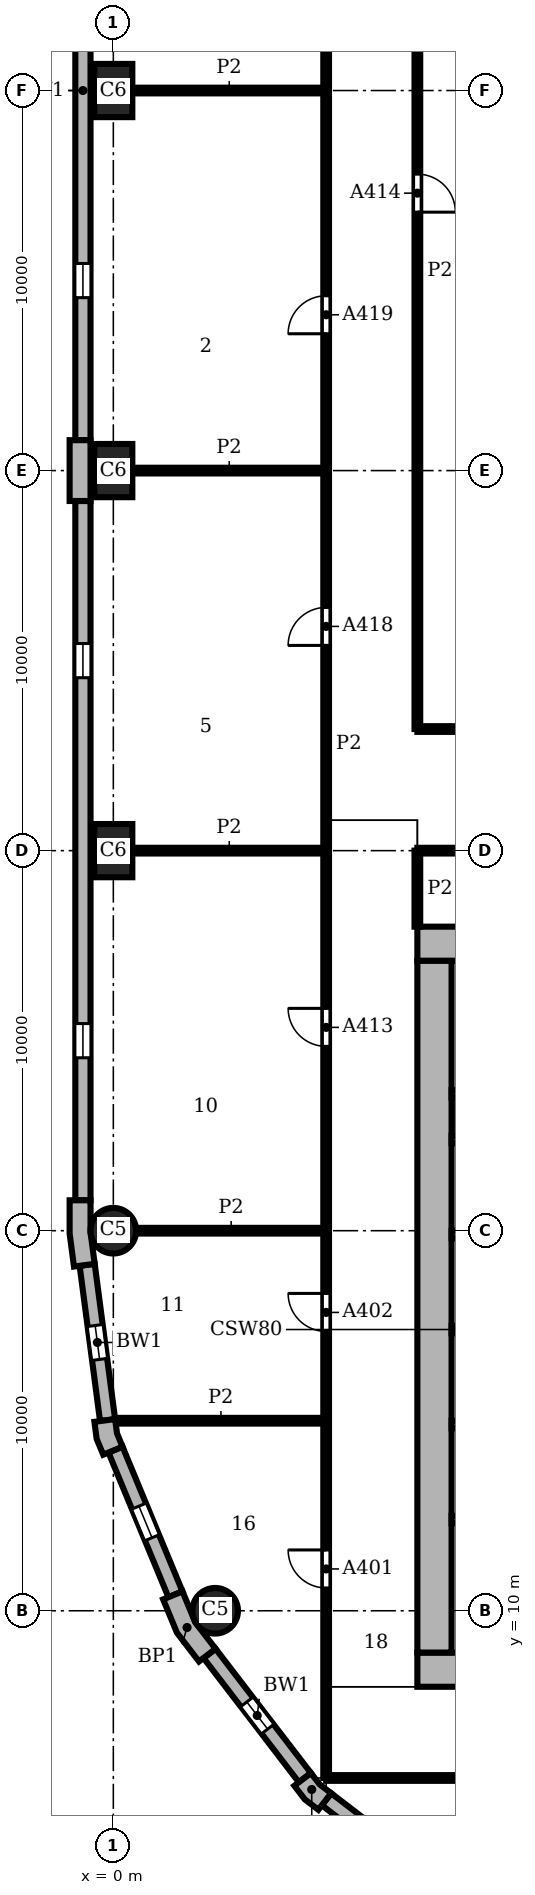
"""IFC4 building model, lengths in metres.
Left out: names, types, materials, properties, quantities, classifications, styles, units other than length and angle.
Written with IfcOpenShell. Run it as: python <this file> out.ifc"""

import sys

from ifc_helpers import new_model, si_unit, direction, frame, frame_2d, origin, origin_2d, place, context, subcontext, project, spatial, polyline, rectangle, circle, outline, extrude, element, fill, save


model = new_model("IFC4")
c1 = context("Model", 3, precision=1e-05, world=origin(), true_north=direction((0.0, 1.0)))
c2 = subcontext(c1, "Body", "Model", "MODEL_VIEW")
j1 = project(units=[si_unit("LENGTHUNIT", "METRE"), si_unit("PLANEANGLEUNIT", "RADIAN")], contexts=[c1])
p1 = place(None, origin())
s1 = spatial("IfcSite", under=j1, at=p1, CompositionType="ELEMENT")
p2 = place(p1, origin())
s2 = spatial("IfcBuilding", under=s1, at=p2, CompositionType="ELEMENT")
p3 = place(p2, frame((0.0, 0.0, 47.1)))
s3 = spatial("IfcBuildingStorey", under=s2, at=p3, CompositionType="ELEMENT", Elevation=47.1)
for number, where, z_axis, x_axis in (
    (1, (0.0, 50.0, 0.0), (0.0, 0.0, 1.0), (0.0, 1.0, 0.0)),
    (2, (0.0, 40.0, 0.0), (0.0, 0.0, 1.0), (0.0, 1.0, 0.0)),
    (3, (0.0, 30.0, 0.0), (0.0, 0.0, 1.0), (0.0, 1.0, 0.0)),
):
    element("IfcColumn", number, at=place(p3, frame(where, z_axis=z_axis, x_axis=x_axis)), inside=s3, PredefinedType="COLUMN", context=c2, shape_type="SweptSolid", body=[
        extrude(rectangle(XDim=1.4, YDim=1.0, at=origin_2d()), origin(), (0.0, 0.0, 1.0), 3.9),
    ])
for number, where, z_axis, x_axis in (
    (4, (0.0, 20.0, 0.0), (0.0, 0.0, 1.0), (1.0, 0.0, 0.0)),
    (5, (2.679, 10.0, 0.0), (0.0, 0.0, 1.0), (1.0, 0.0, 0.0)),
):
    element("IfcColumn", number, at=place(p3, frame(where, z_axis=z_axis, x_axis=x_axis)), inside=s3, PredefinedType="COLUMN", context=c2, shape_type="SweptSolid", body=[
        extrude(circle(Radius=0.6, at=origin_2d()), origin(), (0.0, 0.0, 1.0), 3.9),
    ])
for number, where, z_axis, x_axis in (
    (6, (8.0, 8.45, 0.0), (0.0, 0.0, 1.0), (1.0, 0.0, 0.0)),
    (7, (28.0, 27.55, 0.0), (0.0, 0.0, 1.0), (-1.0, 0.0, 0.0)),
):
    element("IfcWall", number, at=place(p3, frame(where, z_axis=z_axis, x_axis=x_axis)), inside=s3, PredefinedType="SHEAR", context=c2, shape_type="SweptSolid", body=[
        extrude(rectangle(XDim=20.0, YDim=0.9, at=frame_2d((10.0, 0.0))), origin(), (0.0, 0.0, 1.0), 3.9),
    ])
p4 = place(p3, frame((8.45, 27.1, 0.0), z_axis=(0.0, 0.0, 1.0), x_axis=(0.0, -1.0, 0.0)))
e8 = element("IfcWall", 8, at=p4, inside=s3, PredefinedType="SHEAR", context=c2, shape_type="SweptSolid", body=[
    extrude(rectangle(XDim=18.2, YDim=0.9, at=frame_2d((9.1, 0.0))), origin(), (0.0, 0.0, 1.0), 3.9),
])
p5 = place(p3, origin())
e9 = element("IfcWall", 9, at=p5, inside=s3, PredefinedType="SOLIDWALL", context=c2, shape_type="SweptSolid", body=[
    extrude(outline(polyline([(-1.0, 40.8), (-1.15, 40.8), (-1.15, 40.0), (-1.15, 39.2), (-1.0, 39.2), (-0.6, 39.2), (-0.6, 40.0), (-0.6, 40.8), (-1.0, 40.8)])), origin(), (0.0, 0.0, 1.0), 3.9),
])
e10 = element("IfcWall", 10, at=p5, inside=s3, PredefinedType="SOLIDWALL", context=c2, shape_type="SweptSolid", body=[
    extrude(outline(polyline([(-1.0, 20.8), (-1.15, 20.8), (-1.15, 19.925), (-1.036, 19.057), (-0.887, 19.076), (-0.49, 19.128), (-0.6, 19.961), (-0.6, 20.8), (-1.0, 20.8)])), origin(), (0.0, 0.0, 1.0), 3.9),
])
e11 = element("IfcWall", 11, at=p5, inside=s3, PredefinedType="SOLIDWALL", context=c2, shape_type="SweptSolid", body=[
    extrude(outline(polyline([(-0.349, 14.99), (-0.498, 14.971), (-0.439, 14.523), (-0.266, 14.106), (-0.128, 14.164), (0.242, 14.317), (0.097, 14.667), (0.047, 15.043), (-0.349, 14.99)])), origin(), (0.0, 0.0, 1.0), 3.9),
])
e12 = element("IfcWall", 12, at=p5, inside=s3, PredefinedType="SOLIDWALL", context=c2, shape_type="SweptSolid", body=[
    extrude(outline(polyline([(1.449, 10.356), (1.311, 10.299), (1.675, 9.42), (2.254, 8.665), (2.373, 8.757), (2.69, 9.0), (2.155, 9.698), (1.819, 10.51), (1.449, 10.356)])), origin(), (0.0, 0.0, 1.0), 3.9),
])
e13 = element("IfcWall", 13, at=p5, inside=s3, PredefinedType="SOLIDWALL", context=c2, shape_type="SweptSolid", body=[
    extrude(outline(polyline([(4.882, 5.487), (4.763, 5.396), (5.038, 5.038), (5.396, 4.763), (5.487, 4.882), (5.731, 5.199), (5.43, 5.43), (5.199, 5.731), (4.882, 5.487)])), origin(), (0.0, 0.0, 1.0), 3.9),
])
p6 = place(p3, frame((-0.8, 59.2, 0.0), z_axis=(0.0, 0.0, 1.0), x_axis=(0.0, -1.0, 0.0)))
e14 = element("IfcWall", 14, at=p6, inside=s3, PredefinedType="SOLIDWALL", context=c2, shape_type="SweptSolid", body=[
    extrude(rectangle(XDim=18.4, YDim=0.4, at=frame_2d((9.2, 0.0))), origin(), (0.0, 0.0, 1.0), 3.9),
])
p7 = place(p6, frame((3.75, 0.0, 0.9)))
e15 = element("IfcOpeningElement", 15, at=p7, cuts=e14, PredefinedType="OPENING", context=c2, shape_type="SweptSolid", body=[
    extrude(rectangle(XDim=0.9, YDim=2.35, at=frame_2d((0.45, 1.175))), frame((0.0, 0.21, 0.0), z_axis=(0.0, -1.0, 0.0), x_axis=(1.0, 0.0, 0.0)), (0.0, 0.0, 1.0), 0.42),
])
p8 = place(p6, frame((13.75, 0.0, 0.9)))
e16 = element("IfcOpeningElement", 16, at=p8, cuts=e14, PredefinedType="OPENING", context=c2, shape_type="SweptSolid", body=[
    extrude(rectangle(XDim=0.9, YDim=2.35, at=frame_2d((0.45, 1.175))), frame((0.0, 0.21, 0.0), z_axis=(0.0, -1.0, 0.0), x_axis=(1.0, 0.0, 0.0)), (0.0, 0.0, 1.0), 0.42),
])
p9 = place(p3, frame((-0.8, 39.2, 0.0), z_axis=(0.0, 0.0, 1.0), x_axis=(0.0, -1.0, 0.0)))
e17 = element("IfcWall", 17, at=p9, inside=s3, PredefinedType="SOLIDWALL", context=c2, shape_type="SweptSolid", body=[
    extrude(rectangle(XDim=18.4, YDim=0.4, at=frame_2d((9.2, 0.0))), origin(), (0.0, 0.0, 1.0), 3.9),
])
p10 = place(p9, frame((3.75, 0.0, 0.9)))
e18 = element("IfcOpeningElement", 18, at=p10, cuts=e17, PredefinedType="OPENING", context=c2, shape_type="SweptSolid", body=[
    extrude(rectangle(XDim=0.9, YDim=2.35, at=frame_2d((0.45, 1.175))), frame((0.0, 0.21, 0.0), z_axis=(0.0, -1.0, 0.0), x_axis=(1.0, 0.0, 0.0)), (0.0, 0.0, 1.0), 0.42),
])
p11 = place(p9, frame((13.75, 0.0, 0.9)))
e19 = element("IfcOpeningElement", 19, at=p11, cuts=e17, PredefinedType="OPENING", context=c2, shape_type="SweptSolid", body=[
    extrude(rectangle(XDim=0.9, YDim=2.35, at=frame_2d((0.45, 1.175))), frame((0.0, 0.21, 0.0), z_axis=(0.0, -1.0, 0.0), x_axis=(1.0, 0.0, 0.0)), (0.0, 0.0, 1.0), 0.42),
])
p12 = place(p3, frame((-0.689, 19.102, 0.0), z_axis=(0.0, 0.0, 1.0), x_axis=(0.130514280502, -0.991446429508, 0.0)))
e20 = element("IfcWall", 20, at=p12, inside=s3, PredefinedType="SOLIDWALL", context=c2, shape_type="SweptSolid", body=[
    extrude(rectangle(XDim=4.121, YDim=0.4, at=frame_2d((2.061, 0.0))), origin(), (0.0, 0.0, 1.0), 3.9),
])
p13 = place(p12, frame((1.611, 0.0, 0.9)))
e21 = element("IfcOpeningElement", 21, at=p13, cuts=e20, PredefinedType="OPENING", context=c2, shape_type="SweptSolid", body=[
    extrude(rectangle(XDim=0.9, YDim=2.35, at=frame_2d((0.45, 1.175))), frame((0.0, 0.21, 0.0), z_axis=(0.0, -1.0, 0.0), x_axis=(1.0, 0.0, 0.0)), (0.0, 0.0, 1.0), 0.42),
])
p14 = place(p3, frame((0.057, 14.24, 0.0), z_axis=(0.0, 0.0, 1.0), x_axis=(0.382721546029, -0.923863744394, 0.0)))
e22 = element("IfcWall", 22, at=p14, inside=s3, PredefinedType="SOLIDWALL", context=c2, shape_type="SweptSolid", body=[
    extrude(rectangle(XDim=4.121, YDim=0.4, at=frame_2d((2.061, 0.0))), origin(), (0.0, 0.0, 1.0), 3.9),
])
p15 = place(p14, frame((1.611, 0.0, 0.9)))
e23 = element("IfcOpeningElement", 23, at=p15, cuts=e22, PredefinedType="OPENING", context=c2, shape_type="SweptSolid", body=[
    extrude(rectangle(XDim=0.9, YDim=2.35, at=frame_2d((0.45, 1.175))), frame((0.0, 0.21, 0.0), z_axis=(0.0, -1.0, 0.0), x_axis=(1.0, 0.0, 0.0)), (0.0, 0.0, 1.0), 0.42),
])
p16 = place(p3, frame((2.532, 8.878, 0.0), z_axis=(0.0, 0.0, 1.0), x_axis=(0.608759824817, -0.793354571229, 0.0)))
e24 = element("IfcWall", 24, at=p16, inside=s3, PredefinedType="SOLIDWALL", context=c2, shape_type="SweptSolid", body=[
    extrude(rectangle(XDim=4.121, YDim=0.4, at=frame_2d((2.061, 0.0))), origin(), (0.0, 0.0, 1.0), 3.9),
])
p17 = place(p16, frame((1.611, 0.0, 0.9)))
e25 = element("IfcOpeningElement", 25, at=p17, cuts=e24, PredefinedType="OPENING", context=c2, shape_type="SweptSolid", body=[
    extrude(rectangle(XDim=0.9, YDim=2.35, at=frame_2d((0.45, 1.175))), frame((0.0, 0.21, 0.0), z_axis=(0.0, -1.0, 0.0), x_axis=(1.0, 0.0, 0.0)), (0.0, 0.0, 1.0), 0.42),
])
p18 = place(p3, frame((5.609, 5.041, 0.0), z_axis=(0.0, 0.0, 1.0), x_axis=(0.793354571229, -0.608759824817, 0.0)))
e26 = element("IfcWall", 26, at=p18, inside=s3, PredefinedType="SOLIDWALL", context=c2, shape_type="SweptSolid", body=[
    extrude(rectangle(XDim=4.121, YDim=0.4, at=frame_2d((2.061, 0.0))), origin(), (0.0, 0.0, 1.0), 3.9),
])
p19 = place(p18, frame((1.611, 0.0, 0.9)))
e27 = element("IfcOpeningElement", 27, at=p19, cuts=e26, PredefinedType="OPENING", context=c2, shape_type="SweptSolid", body=[
    extrude(rectangle(XDim=0.9, YDim=2.35, at=frame_2d((0.45, 1.175))), frame((0.0, 0.21, 0.0), z_axis=(0.0, -1.0, 0.0), x_axis=(1.0, 0.0, 0.0)), (0.0, 0.0, 1.0), 0.42),
])
p20 = place(p3, frame((8.9, 12.4, 0.0), z_axis=(0.0, 0.0, 1.0), x_axis=(1.0, 0.0, 0.0)))
e28 = element("IfcWall", 28, at=p20, inside=s3, PredefinedType="SHEAR", context=c2, shape_type="SweptSolid", body=[
    extrude(rectangle(XDim=4.9, YDim=0.2, at=frame_2d((2.45, 0.0))), origin(), (0.0, 0.0, 1.0), 3.58),
])
for number, where, z_axis, x_axis in (
    (29, (8.9, 14.9, 0.0), (0.0, 0.0, 1.0), (1.0, 0.0, 0.0)),
    (30, (8.9, 17.4, 0.0), (0.0, 0.0, 1.0), (1.0, 0.0, 0.0)),
    (31, (8.9, 19.9, 0.0), (0.0, 0.0, 1.0), (1.0, 0.0, 0.0)),
    (32, (8.9, 22.4, 0.0), (0.0, 0.0, 1.0), (1.0, 0.0, 0.0)),
):
    element("IfcWall", number, at=place(p3, frame(where, z_axis=z_axis, x_axis=x_axis)), inside=s3, PredefinedType="SHEAR", context=c2, shape_type="SweptSolid", body=[
        extrude(rectangle(XDim=2.8, YDim=0.2, at=frame_2d((1.4, 0.0))), origin(), (0.0, 0.0, 1.0), 3.58),
    ])
p21 = place(p3, frame((8.9, 23.6, 0.0), z_axis=(0.0, 0.0, 1.0), x_axis=(1.0, 0.0, 0.0)))
e33 = element("IfcWall", 33, at=p21, inside=s3, PredefinedType="SHEAR", context=c2, shape_type="SweptSolid", body=[
    extrude(rectangle(XDim=4.9, YDim=0.2, at=frame_2d((2.45, 0.0))), origin(), (0.0, 0.0, 1.0), 3.58),
])
p22 = place(p3, frame((5.6, 5.6, 0.0), z_axis=(0.0, 0.0, 1.0), x_axis=(0.0, 1.0, 0.0)))
e34 = element("IfcWall", 34, at=p22, inside=s3, PredefinedType="PARTITIONING", context=c2, shape_type="SweptSolid", body=[
    extrude(rectangle(XDim=54.4, YDim=0.15, at=frame_2d((27.2, 0.0))), origin(), (0.0, 0.0, 1.0), 3.58),
])
p23 = place(p22, frame((5.0, 0.0, 0.0)))
e35 = element("IfcOpeningElement", 35, at=p23, cuts=e34, PredefinedType="OPENING", context=c2, shape_type="SweptSolid", body=[
    extrude(rectangle(XDim=1.0, YDim=2.1, at=frame_2d((0.5, 1.05))), frame((0.0, 0.085, 0.0), z_axis=(0.0, -1.0, 0.0), x_axis=(1.0, 0.0, 0.0)), (0.0, 0.0, 1.0), 0.17),
])
p24 = place(p22, frame((11.75, 0.0, 0.0)))
e36 = element("IfcOpeningElement", 36, at=p24, cuts=e34, PredefinedType="OPENING", context=c2, shape_type="SweptSolid", body=[
    extrude(rectangle(XDim=1.0, YDim=2.1, at=frame_2d((0.5, 1.05))), frame((0.0, 0.085, 0.0), z_axis=(0.0, -1.0, 0.0), x_axis=(1.0, 0.0, 0.0)), (0.0, 0.0, 1.0), 0.17),
])
p25 = place(p22, frame((19.25, 0.0, 0.0)))
e37 = element("IfcOpeningElement", 37, at=p25, cuts=e34, PredefinedType="OPENING", context=c2, shape_type="SweptSolid", body=[
    extrude(rectangle(XDim=1.0, YDim=2.1, at=frame_2d((0.5, 1.05))), frame((0.0, 0.085, 0.0), z_axis=(0.0, -1.0, 0.0), x_axis=(1.0, 0.0, 0.0)), (0.0, 0.0, 1.0), 0.17),
])
p26 = place(p22, frame((29.8, 0.0, 0.0)))
e38 = element("IfcOpeningElement", 38, at=p26, cuts=e34, PredefinedType="OPENING", context=c2, shape_type="SweptSolid", body=[
    extrude(rectangle(XDim=1.0, YDim=2.1, at=frame_2d((0.5, 1.05))), frame((0.0, 0.085, 0.0), z_axis=(0.0, -1.0, 0.0), x_axis=(1.0, 0.0, 0.0)), (0.0, 0.0, 1.0), 0.17),
])
p27 = place(p22, frame((38.0, 0.0, 0.0)))
e39 = element("IfcOpeningElement", 39, at=p27, cuts=e34, PredefinedType="OPENING", context=c2, shape_type="SweptSolid", body=[
    extrude(rectangle(XDim=1.0, YDim=2.1, at=frame_2d((0.5, 1.05))), frame((0.0, 0.085, 0.0), z_axis=(0.0, -1.0, 0.0), x_axis=(1.0, 0.0, 0.0)), (0.0, 0.0, 1.0), 0.17),
])
p28 = place(p22, frame((48.25, 0.0, 0.0)))
e40 = element("IfcOpeningElement", 40, at=p28, cuts=e34, PredefinedType="OPENING", context=c2, shape_type="SweptSolid", body=[
    extrude(rectangle(XDim=1.0, YDim=2.1, at=frame_2d((0.5, 1.05))), frame((0.0, 0.085, 0.0), z_axis=(0.0, -1.0, 0.0), x_axis=(1.0, 0.0, 0.0)), (0.0, 0.0, 1.0), 0.17),
])
p29 = place(p3, frame((8.0, 28.0, 0.0), z_axis=(0.0, 0.0, 1.0), x_axis=(0.0, 1.0, 0.0)))
e41 = element("IfcWall", 41, at=p29, inside=s3, PredefinedType="PARTITIONING", context=c2, shape_type="SweptSolid", body=[
    extrude(rectangle(XDim=2.0, YDim=0.15, at=frame_2d((1.0, 0.0))), origin(), (0.0, 0.0, 1.0), 3.58),
])
p30 = place(p3, frame((8.0, 33.2, 0.0), z_axis=(0.0, 0.0, 1.0), x_axis=(0.0, 1.0, 0.0)))
e42 = element("IfcWall", 42, at=p30, inside=s3, PredefinedType="PARTITIONING", context=c2, shape_type="SweptSolid", body=[
    extrude(rectangle(XDim=24.1, YDim=0.15, at=frame_2d((12.05, 0.0))), origin(), (0.0, 0.0, 1.0), 3.58),
])
p31 = place(p30, frame((13.6, 0.0, 0.0)))
e43 = element("IfcOpeningElement", 43, at=p31, cuts=e42, PredefinedType="OPENING", context=c2, shape_type="SweptSolid", body=[
    extrude(rectangle(XDim=1.0, YDim=2.1, at=frame_2d((0.5, 1.05))), frame((0.0, 0.085, 0.0), z_axis=(0.0, -1.0, 0.0), x_axis=(1.0, 0.0, 0.0)), (0.0, 0.0, 1.0), 0.17),
])
p32 = place(p3, frame((5.6, 5.6, 0.0), z_axis=(0.0, 0.0, 1.0), x_axis=(1.0, 0.0, 0.0)))
e44 = element("IfcWall", 44, at=p32, inside=s3, PredefinedType="PARTITIONING", context=c2, shape_type="SweptSolid", body=[
    extrude(rectangle(XDim=25.4, YDim=0.15, at=frame_2d((12.7, 0.0))), origin(), (0.0, 0.0, 1.0), 3.58),
])
p33 = place(p32, frame((5.35, 0.0, 0.0)))
e45 = element("IfcOpeningElement", 45, at=p33, cuts=e44, PredefinedType="OPENING", context=c2, shape_type="SweptSolid", body=[
    extrude(rectangle(XDim=1.0, YDim=2.1, at=frame_2d((0.5, 1.05))), frame((0.0, 0.085, 0.0), z_axis=(0.0, -1.0, 0.0), x_axis=(1.0, 0.0, 0.0)), (0.0, 0.0, 1.0), 0.17),
])
p34 = place(p32, frame((12.0, 0.0, 0.0)))
e46 = element("IfcOpeningElement", 46, at=p34, cuts=e44, PredefinedType="OPENING", context=c2, shape_type="SweptSolid", body=[
    extrude(rectangle(XDim=0.8, YDim=2.1, at=frame_2d((0.4, 1.05))), frame((0.0, 0.085, 0.0), z_axis=(0.0, -1.0, 0.0), x_axis=(1.0, 0.0, 0.0)), (0.0, 0.0, 1.0), 0.17),
])
p35 = place(p32, frame((19.25, 0.0, 0.0)))
e47 = element("IfcOpeningElement", 47, at=p35, cuts=e44, PredefinedType="OPENING", context=c2, shape_type="SweptSolid", body=[
    extrude(rectangle(XDim=1.0, YDim=2.1, at=frame_2d((0.5, 1.05))), frame((0.0, 0.085, 0.0), z_axis=(0.0, -1.0, 0.0), x_axis=(1.0, 0.0, 0.0)), (0.0, 0.0, 1.0), 0.17),
])
p36 = place(p3, frame((0.063, 15.0, 0.0), z_axis=(0.0, 0.0, 1.0), x_axis=(1.0, 0.0, 0.0)))
e48 = element("IfcWall", 48, at=p36, inside=s3, PredefinedType="PARTITIONING", context=c2, shape_type="SweptSolid", body=[
    extrude(rectangle(XDim=5.537, YDim=0.15, at=frame_2d((2.769, 0.0))), origin(), (0.0, 0.0, 1.0), 3.58),
])
p37 = place(p3, frame((0.6, 20.0, 0.0), z_axis=(0.0, 0.0, 1.0), x_axis=(1.0, 0.0, 0.0)))
e49 = element("IfcWall", 49, at=p37, inside=s3, PredefinedType="PARTITIONING", context=c2, shape_type="SweptSolid", body=[
    extrude(rectangle(XDim=5.0, YDim=0.15, at=frame_2d((2.5, 0.0))), origin(), (0.0, 0.0, 1.0), 3.58),
])
p38 = place(p3, frame((0.5, 30.0, 0.0), z_axis=(0.0, 0.0, 1.0), x_axis=(1.0, 0.0, 0.0)))
e50 = element("IfcWall", 50, at=p38, inside=s3, PredefinedType="PARTITIONING", context=c2, shape_type="SweptSolid", body=[
    extrude(rectangle(XDim=5.1, YDim=0.15, at=frame_2d((2.55, 0.0))), origin(), (0.0, 0.0, 1.0), 3.58),
])
p39 = place(p3, frame((8.0, 30.0, 0.0), z_axis=(0.0, 0.0, 1.0), x_axis=(1.0, 0.0, 0.0)))
e51 = element("IfcWall", 51, at=p39, inside=s3, PredefinedType="PARTITIONING", context=c2, shape_type="SweptSolid", body=[
    extrude(rectangle(XDim=1.2, YDim=0.15, at=frame_2d((0.6, 0.0))), origin(), (0.0, 0.0, 1.0), 3.58),
])
p40 = place(p3, frame((8.0, 33.2, 0.0), z_axis=(0.0, 0.0, 1.0), x_axis=(1.0, 0.0, 0.0)))
e52 = element("IfcWall", 52, at=p40, inside=s3, PredefinedType="PARTITIONING", context=c2, shape_type="SweptSolid", body=[
    extrude(rectangle(XDim=5.8, YDim=0.15, at=frame_2d((2.9, 0.0))), origin(), (0.0, 0.0, 1.0), 3.58),
])
for number, where, z_axis, x_axis in (
    (53, (0.5, 40.0, 0.0), (0.0, 0.0, 1.0), (1.0, 0.0, 0.0)),
    (54, (0.5, 50.0, 0.0), (0.0, 0.0, 1.0), (1.0, 0.0, 0.0)),
):
    element("IfcWall", number, at=place(p3, frame(where, z_axis=z_axis, x_axis=x_axis)), inside=s3, PredefinedType="PARTITIONING", context=c2, shape_type="SweptSolid", body=[
        extrude(rectangle(XDim=5.1, YDim=0.15, at=frame_2d((2.55, 0.0))), origin(), (0.0, 0.0, 1.0), 3.58),
    ])
p41 = place(p8, origin())
e55 = element("IfcWindow", 55, at=p41, inside=s3, PartitioningType="SINGLE_PANEL", PredefinedType="WINDOW", context=c2, shape_type="SweptSolid", body=[
    extrude(rectangle(XDim=0.9, YDim=2.35, at=frame_2d((0.45, 1.175))), frame((0.0, 0.16, 0.0), z_axis=(0.0, -1.0, 0.0), x_axis=(1.0, 0.0, 0.0)), (0.0, 0.0, 1.0), 0.06),
])
fill(e16, e55)
p42 = place(p10, origin())
e56 = element("IfcWindow", 56, at=p42, inside=s3, PartitioningType="SINGLE_PANEL", PredefinedType="WINDOW", context=c2, shape_type="SweptSolid", body=[
    extrude(rectangle(XDim=0.9, YDim=2.35, at=frame_2d((0.45, 1.175))), frame((0.0, 0.16, 0.0), z_axis=(0.0, -1.0, 0.0), x_axis=(1.0, 0.0, 0.0)), (0.0, 0.0, 1.0), 0.06),
])
fill(e18, e56)
p43 = place(p11, origin())
e57 = element("IfcWindow", 57, at=p43, inside=s3, PartitioningType="SINGLE_PANEL", PredefinedType="WINDOW", context=c2, shape_type="SweptSolid", body=[
    extrude(rectangle(XDim=0.9, YDim=2.35, at=frame_2d((0.45, 1.175))), frame((0.0, 0.16, 0.0), z_axis=(0.0, -1.0, 0.0), x_axis=(1.0, 0.0, 0.0)), (0.0, 0.0, 1.0), 0.06),
])
fill(e19, e57)
p44 = place(p13, origin())
e58 = element("IfcWindow", 58, at=p44, inside=s3, PartitioningType="SINGLE_PANEL", PredefinedType="WINDOW", context=c2, shape_type="SweptSolid", body=[
    extrude(rectangle(XDim=0.9, YDim=2.35, at=frame_2d((0.45, 1.175))), frame((0.0, 0.16, 0.0), z_axis=(0.0, -1.0, 0.0), x_axis=(1.0, 0.0, 0.0)), (0.0, 0.0, 1.0), 0.06),
])
fill(e21, e58)
p45 = place(p15, origin())
e59 = element("IfcWindow", 59, at=p45, inside=s3, PartitioningType="SINGLE_PANEL", PredefinedType="WINDOW", context=c2, shape_type="SweptSolid", body=[
    extrude(rectangle(XDim=0.9, YDim=2.35, at=frame_2d((0.45, 1.175))), frame((0.0, 0.16, 0.0), z_axis=(0.0, -1.0, 0.0), x_axis=(1.0, 0.0, 0.0)), (0.0, 0.0, 1.0), 0.06),
])
fill(e23, e59)
p46 = place(p17, origin())
e60 = element("IfcWindow", 60, at=p46, inside=s3, PartitioningType="SINGLE_PANEL", PredefinedType="WINDOW", context=c2, shape_type="SweptSolid", body=[
    extrude(rectangle(XDim=0.9, YDim=2.35, at=frame_2d((0.45, 1.175))), frame((0.0, 0.16, 0.0), z_axis=(0.0, -1.0, 0.0), x_axis=(1.0, 0.0, 0.0)), (0.0, 0.0, 1.0), 0.06),
])
fill(e25, e60)
p47 = place(p23, origin())
e61 = element("IfcDoor", 61, at=p47, inside=s3, OperationType="SINGLE_SWING_RIGHT", PredefinedType="DOOR", context=c2, shape_type="SweptSolid", body=[
    extrude(rectangle(XDim=1.0, YDim=2.1, at=frame_2d((0.5, 1.05))), frame((0.0, 0.025, 0.0), z_axis=(0.0, -1.0, 0.0), x_axis=(1.0, 0.0, 0.0)), (0.0, 0.0, 1.0), 0.05),
])
fill(e35, e61)
p48 = place(p24, origin())
e62 = element("IfcDoor", 62, at=p48, inside=s3, OperationType="SINGLE_SWING_RIGHT", PredefinedType="DOOR", context=c2, shape_type="SweptSolid", body=[
    extrude(rectangle(XDim=1.0, YDim=2.1, at=frame_2d((0.5, 1.05))), frame((0.0, 0.025, 0.0), z_axis=(0.0, -1.0, 0.0), x_axis=(1.0, 0.0, 0.0)), (0.0, 0.0, 1.0), 0.05),
])
fill(e36, e62)
p49 = place(p25, origin())
e63 = element("IfcDoor", 63, at=p49, inside=s3, OperationType="SINGLE_SWING_RIGHT", PredefinedType="DOOR", context=c2, shape_type="SweptSolid", body=[
    extrude(rectangle(XDim=1.0, YDim=2.1, at=frame_2d((0.5, 1.05))), frame((0.0, 0.025, 0.0), z_axis=(0.0, -1.0, 0.0), x_axis=(1.0, 0.0, 0.0)), (0.0, 0.0, 1.0), 0.05),
])
fill(e37, e63)
p50 = place(p31, frame((1.0, 0.0, 0.0), z_axis=(0.0, 0.0, 1.0), x_axis=(-1.0, 0.0, 0.0)))
e64 = element("IfcDoor", 64, at=p50, inside=s3, OperationType="SINGLE_SWING_RIGHT", PredefinedType="DOOR", context=c2, shape_type="SweptSolid", body=[
    extrude(rectangle(XDim=1.0, YDim=2.1, at=frame_2d((0.5, 1.05))), frame((0.0, 0.025, 0.0), z_axis=(0.0, -1.0, 0.0), x_axis=(1.0, 0.0, 0.0)), (0.0, 0.0, 1.0), 0.05),
])
fill(e43, e64)
p51 = place(p26, origin())
e65 = element("IfcDoor", 65, at=p51, inside=s3, OperationType="SINGLE_SWING_LEFT", PredefinedType="DOOR", context=c2, shape_type="SweptSolid", body=[
    extrude(rectangle(XDim=1.0, YDim=2.1, at=frame_2d((0.5, 1.05))), frame((0.0, 0.025, 0.0), z_axis=(0.0, -1.0, 0.0), x_axis=(1.0, 0.0, 0.0)), (0.0, 0.0, 1.0), 0.05),
])
fill(e38, e65)
p52 = place(p27, origin())
e66 = element("IfcDoor", 66, at=p52, inside=s3, OperationType="SINGLE_SWING_LEFT", PredefinedType="DOOR", context=c2, shape_type="SweptSolid", body=[
    extrude(rectangle(XDim=1.0, YDim=2.1, at=frame_2d((0.5, 1.05))), frame((0.0, 0.025, 0.0), z_axis=(0.0, -1.0, 0.0), x_axis=(1.0, 0.0, 0.0)), (0.0, 0.0, 1.0), 0.05),
])
fill(e39, e66)
save(model, sys.argv[1])
